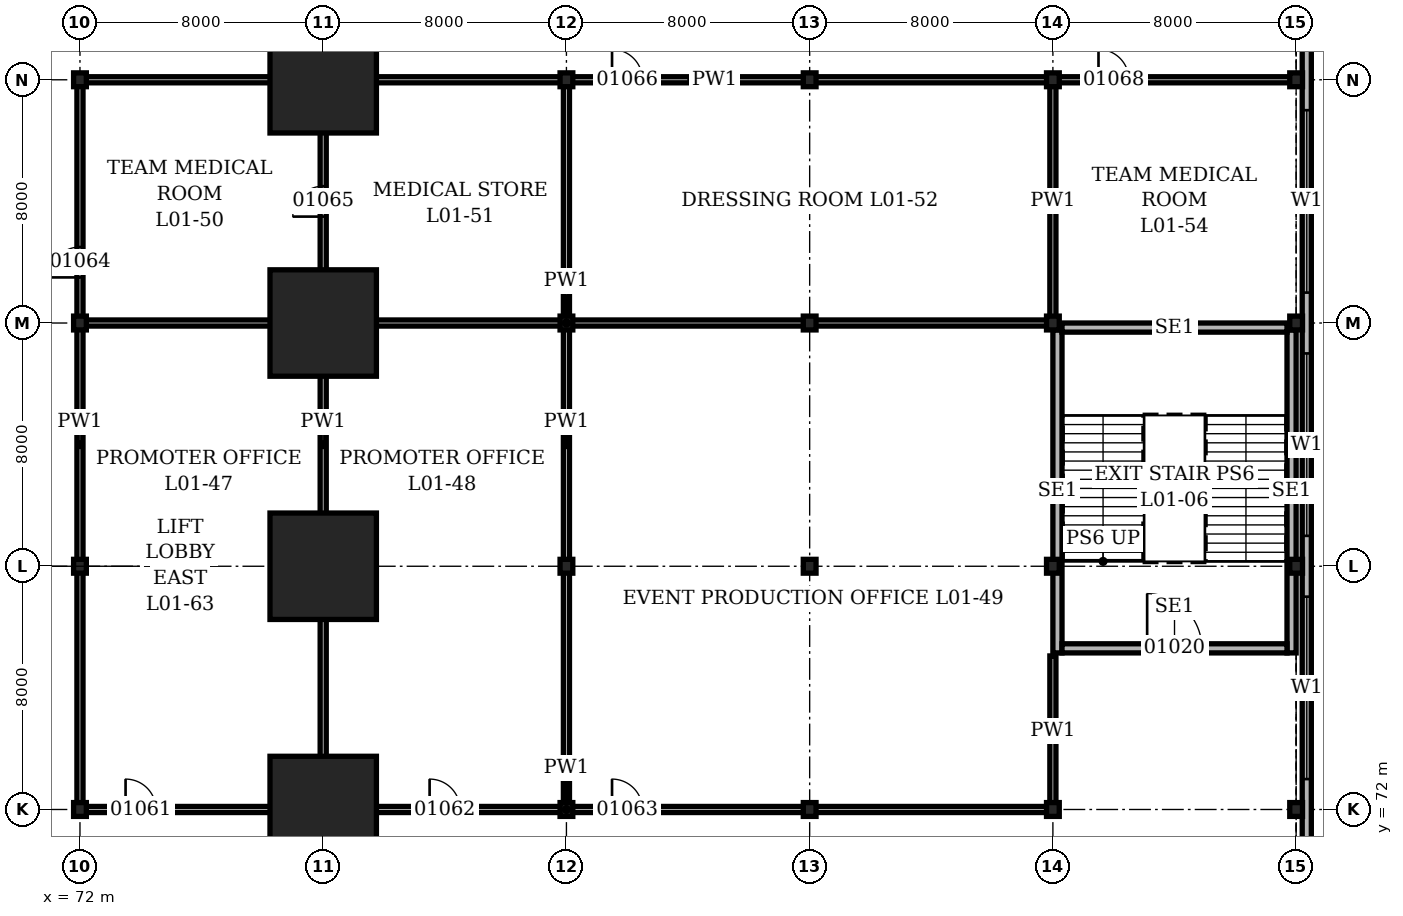
"""IFC4 building model, lengths in metres.
Left out: names, types, materials, properties, quantities, classifications, styles, units other than length and angle.
Written with IfcOpenShell. Run it as: python <this file> out.ifc"""

import sys

from ifc_helpers import new_model, si_unit, direction, frame, frame_2d, origin, origin_2d, place, context, subcontext, project, spatial, rectangle, hollow_rectangle, i_section, extrude, element, fill, save


model = new_model("IFC4")
c1 = context("Model", 3, precision=1e-05, world=origin(), true_north=direction((0.0, 1.0)))
c2 = subcontext(c1, "Body", "Model", "MODEL_VIEW")
j1 = project(units=[si_unit("LENGTHUNIT", "METRE"), si_unit("PLANEANGLEUNIT", "RADIAN")], contexts=[c1])
p1 = place(None, origin())
s1 = spatial("IfcSite", under=j1, at=p1, CompositionType="ELEMENT")
p2 = place(p1, origin())
s2 = spatial("IfcBuilding", under=s1, at=p2, CompositionType="ELEMENT")
p3 = place(p2, frame((0.0, 0.0, 4.9)))
s3 = spatial("IfcBuildingStorey", under=s2, at=p3, CompositionType="ELEMENT", Elevation=4.9)
for number, where, z_axis, x_axis in (
    (1, (72.0, 72.0, 0.0), (0.0, 0.0, 1.0), (1.0, 0.0, 0.0)),
    (2, (72.0, 80.0, 0.0), (0.0, 0.0, 1.0), (1.0, 0.0, 0.0)),
    (3, (72.0, 88.0, 0.0), (0.0, 0.0, 1.0), (1.0, 0.0, 0.0)),
    (4, (72.0, 96.0, 0.0), (0.0, 0.0, 1.0), (1.0, 0.0, 0.0)),
):
    element("IfcColumn", number, at=place(p3, frame(where, z_axis=z_axis, x_axis=x_axis)), inside=s3, PredefinedType="COLUMN", context=c2, shape_type="SweptSolid", body=[
        extrude(i_section(OverallWidth=0.419, OverallDepth=0.455, WebThickness=0.042, FlangeThickness=0.068, at=origin_2d()), origin(), (0.0, 0.0, 1.0), 5.0),
    ])
for number, where, z_axis, x_axis in (
    (5, (80.0, 72.0, 0.0), (0.0, 0.0, 1.0), (1.0, 0.0, 0.0)),
    (6, (80.0, 80.0, 0.0), (0.0, 0.0, 1.0), (1.0, 0.0, 0.0)),
    (7, (80.0, 88.0, 0.0), (0.0, 0.0, 1.0), (1.0, 0.0, 0.0)),
    (8, (80.0, 96.0, 0.0), (0.0, 0.0, 1.0), (1.0, 0.0, 0.0)),
):
    element("IfcColumn", number, at=place(p3, frame(where, z_axis=z_axis, x_axis=x_axis)), inside=s3, PredefinedType="COLUMN", context=c2, shape_type="SweptSolid", body=[
        extrude(hollow_rectangle(XDim=3.5, YDim=3.5, WallThickness=0.5, at=origin_2d()), origin(), (0.0, 0.0, 1.0), 5.0),
    ])
for number, where, z_axis, x_axis in (
    (9, (88.0, 72.0, 0.0), (0.0, 0.0, 1.0), (1.0, 0.0, 0.0)),
    (10, (88.0, 80.0, 0.0), (0.0, 0.0, 1.0), (1.0, 0.0, 0.0)),
    (11, (88.0, 88.0, 0.0), (0.0, 0.0, 1.0), (1.0, 0.0, 0.0)),
    (12, (88.0, 96.0, 0.0), (0.0, 0.0, 1.0), (1.0, 0.0, 0.0)),
    (13, (96.0, 72.0, 0.0), (0.0, 0.0, 1.0), (1.0, 0.0, 0.0)),
    (14, (96.0, 80.0, 0.0), (0.0, 0.0, 1.0), (1.0, 0.0, 0.0)),
    (15, (96.0, 88.0, 0.0), (0.0, 0.0, 1.0), (1.0, 0.0, 0.0)),
    (16, (96.0, 96.0, 0.0), (0.0, 0.0, 1.0), (1.0, 0.0, 0.0)),
    (17, (104.0, 72.0, 0.0), (0.0, 0.0, 1.0), (1.0, 0.0, 0.0)),
    (18, (104.0, 80.0, 0.0), (0.0, 0.0, 1.0), (1.0, 0.0, 0.0)),
    (19, (104.0, 88.0, 0.0), (0.0, 0.0, 1.0), (1.0, 0.0, 0.0)),
    (20, (104.0, 96.0, 0.0), (0.0, 0.0, 1.0), (1.0, 0.0, 0.0)),
    (21, (112.0, 72.0, 0.0), (0.0, 0.0, 1.0), (1.0, 0.0, 0.0)),
    (22, (112.0, 80.0, 0.0), (0.0, 0.0, 1.0), (1.0, 0.0, 0.0)),
    (23, (112.0, 88.0, 0.0), (0.0, 0.0, 1.0), (1.0, 0.0, 0.0)),
    (24, (112.0, 96.0, 0.0), (0.0, 0.0, 1.0), (1.0, 0.0, 0.0)),
):
    element("IfcColumn", number, at=place(p3, frame(where, z_axis=z_axis, x_axis=x_axis)), inside=s3, PredefinedType="COLUMN", context=c2, shape_type="SweptSolid", body=[
        extrude(i_section(OverallWidth=0.419, OverallDepth=0.455, WebThickness=0.042, FlangeThickness=0.068, at=origin_2d()), origin(), (0.0, 0.0, 1.0), 5.0),
    ])
p4 = place(p3, frame((112.35, -0.35, 0.0), z_axis=(0.0, 0.0, 1.0), x_axis=(0.0, 1.0, 0.0)))
e25 = element("IfcWall", 25, at=p4, inside=s3, PredefinedType="SOLIDWALL", context=c2, shape_type="SweptSolid", body=[
    extrude(rectangle(XDim=112.7, YDim=0.3, at=frame_2d((56.35, 0.0))), origin(), (0.0, 0.0, 1.0), 5.0),
])
p5 = place(p4, frame((1.35, 0.0, 1.0)))
e26 = element("IfcOpeningElement", 26, at=p5, cuts=e25, PredefinedType="OPENING", context=c2, shape_type="SweptSolid", body=[
    extrude(rectangle(XDim=6.0, YDim=1.5, at=frame_2d((3.0, 0.75))), frame((0.0, 0.16, 0.0), z_axis=(0.0, -1.0, 0.0), x_axis=(1.0, 0.0, 0.0)), (0.0, 0.0, 1.0), 0.32),
])
p6 = place(p4, frame((9.35, 0.0, 1.0)))
e27 = element("IfcOpeningElement", 27, at=p6, cuts=e25, PredefinedType="OPENING", context=c2, shape_type="SweptSolid", body=[
    extrude(rectangle(XDim=6.0, YDim=1.5, at=frame_2d((3.0, 0.75))), frame((0.0, 0.16, 0.0), z_axis=(0.0, -1.0, 0.0), x_axis=(1.0, 0.0, 0.0)), (0.0, 0.0, 1.0), 0.32),
])
p7 = place(p4, frame((17.35, 0.0, 1.0)))
e28 = element("IfcOpeningElement", 28, at=p7, cuts=e25, PredefinedType="OPENING", context=c2, shape_type="SweptSolid", body=[
    extrude(rectangle(XDim=6.0, YDim=1.5, at=frame_2d((3.0, 0.75))), frame((0.0, 0.16, 0.0), z_axis=(0.0, -1.0, 0.0), x_axis=(1.0, 0.0, 0.0)), (0.0, 0.0, 1.0), 0.32),
])
p8 = place(p4, frame((25.35, 0.0, 1.0)))
e29 = element("IfcOpeningElement", 29, at=p8, cuts=e25, PredefinedType="OPENING", context=c2, shape_type="SweptSolid", body=[
    extrude(rectangle(XDim=6.0, YDim=1.5, at=frame_2d((3.0, 0.75))), frame((0.0, 0.16, 0.0), z_axis=(0.0, -1.0, 0.0), x_axis=(1.0, 0.0, 0.0)), (0.0, 0.0, 1.0), 0.32),
])
p9 = place(p4, frame((33.35, 0.0, 1.0)))
e30 = element("IfcOpeningElement", 30, at=p9, cuts=e25, PredefinedType="OPENING", context=c2, shape_type="SweptSolid", body=[
    extrude(rectangle(XDim=6.0, YDim=1.5, at=frame_2d((3.0, 0.75))), frame((0.0, 0.16, 0.0), z_axis=(0.0, -1.0, 0.0), x_axis=(1.0, 0.0, 0.0)), (0.0, 0.0, 1.0), 0.32),
])
p10 = place(p4, frame((41.35, 0.0, 1.0)))
e31 = element("IfcOpeningElement", 31, at=p10, cuts=e25, PredefinedType="OPENING", context=c2, shape_type="SweptSolid", body=[
    extrude(rectangle(XDim=6.0, YDim=1.5, at=frame_2d((3.0, 0.75))), frame((0.0, 0.16, 0.0), z_axis=(0.0, -1.0, 0.0), x_axis=(1.0, 0.0, 0.0)), (0.0, 0.0, 1.0), 0.32),
])
p11 = place(p4, frame((49.35, 0.0, 1.0)))
e32 = element("IfcOpeningElement", 32, at=p11, cuts=e25, PredefinedType="OPENING", context=c2, shape_type="SweptSolid", body=[
    extrude(rectangle(XDim=6.0, YDim=1.5, at=frame_2d((3.0, 0.75))), frame((0.0, 0.16, 0.0), z_axis=(0.0, -1.0, 0.0), x_axis=(1.0, 0.0, 0.0)), (0.0, 0.0, 1.0), 0.32),
])
p12 = place(p4, frame((57.35, 0.0, 1.0)))
e33 = element("IfcOpeningElement", 33, at=p12, cuts=e25, PredefinedType="OPENING", context=c2, shape_type="SweptSolid", body=[
    extrude(rectangle(XDim=6.0, YDim=1.5, at=frame_2d((3.0, 0.75))), frame((0.0, 0.16, 0.0), z_axis=(0.0, -1.0, 0.0), x_axis=(1.0, 0.0, 0.0)), (0.0, 0.0, 1.0), 0.32),
])
p13 = place(p4, frame((65.35, 0.0, 1.0)))
e34 = element("IfcOpeningElement", 34, at=p13, cuts=e25, PredefinedType="OPENING", context=c2, shape_type="SweptSolid", body=[
    extrude(rectangle(XDim=6.0, YDim=1.5, at=frame_2d((3.0, 0.75))), frame((0.0, 0.16, 0.0), z_axis=(0.0, -1.0, 0.0), x_axis=(1.0, 0.0, 0.0)), (0.0, 0.0, 1.0), 0.32),
])
p14 = place(p4, frame((73.35, 0.0, 1.0)))
e35 = element("IfcOpeningElement", 35, at=p14, cuts=e25, PredefinedType="OPENING", context=c2, shape_type="SweptSolid", body=[
    extrude(rectangle(XDim=6.0, YDim=1.5, at=frame_2d((3.0, 0.75))), frame((0.0, 0.16, 0.0), z_axis=(0.0, -1.0, 0.0), x_axis=(1.0, 0.0, 0.0)), (0.0, 0.0, 1.0), 0.32),
])
p15 = place(p4, frame((81.35, 0.0, 1.0)))
e36 = element("IfcOpeningElement", 36, at=p15, cuts=e25, PredefinedType="OPENING", context=c2, shape_type="SweptSolid", body=[
    extrude(rectangle(XDim=6.0, YDim=1.5, at=frame_2d((3.0, 0.75))), frame((0.0, 0.16, 0.0), z_axis=(0.0, -1.0, 0.0), x_axis=(1.0, 0.0, 0.0)), (0.0, 0.0, 1.0), 0.32),
])
p16 = place(p4, frame((89.35, 0.0, 1.0)))
e37 = element("IfcOpeningElement", 37, at=p16, cuts=e25, PredefinedType="OPENING", context=c2, shape_type="SweptSolid", body=[
    extrude(rectangle(XDim=6.0, YDim=1.5, at=frame_2d((3.0, 0.75))), frame((0.0, 0.16, 0.0), z_axis=(0.0, -1.0, 0.0), x_axis=(1.0, 0.0, 0.0)), (0.0, 0.0, 1.0), 0.32),
])
p17 = place(p4, frame((97.35, 0.0, 1.0)))
e38 = element("IfcOpeningElement", 38, at=p17, cuts=e25, PredefinedType="OPENING", context=c2, shape_type="SweptSolid", body=[
    extrude(rectangle(XDim=6.0, YDim=1.5, at=frame_2d((3.0, 0.75))), frame((0.0, 0.16, 0.0), z_axis=(0.0, -1.0, 0.0), x_axis=(1.0, 0.0, 0.0)), (0.0, 0.0, 1.0), 0.32),
])
p18 = place(p4, frame((105.35, 0.0, 1.0)))
e39 = element("IfcOpeningElement", 39, at=p18, cuts=e25, PredefinedType="OPENING", context=c2, shape_type="SweptSolid", body=[
    extrude(rectangle(XDim=6.0, YDim=1.5, at=frame_2d((3.0, 0.75))), frame((0.0, 0.16, 0.0), z_axis=(0.0, -1.0, 0.0), x_axis=(1.0, 0.0, 0.0)), (0.0, 0.0, 1.0), 0.32),
])
for number, where, z_axis, x_axis in (
    (40, (104.15, 77.15, 0.0), (0.0, 0.0, 1.0), (0.0, 1.0, 0.0)),
    (41, (111.85, 77.15, 0.0), (0.0, 0.0, 1.0), (0.0, 1.0, 0.0)),
):
    element("IfcWall", number, at=place(p3, frame(where, z_axis=z_axis, x_axis=x_axis)), inside=s3, PredefinedType="SOLIDWALL", context=c2, shape_type="SweptSolid", body=[
        extrude(rectangle(XDim=10.623, YDim=0.3, at=frame_2d((5.312, 0.0))), origin(), (0.0, 0.0, 1.0), 4.8),
    ])
p19 = place(p3, frame((104.3, 77.3, 0.0), z_axis=(0.0, 0.0, 1.0), x_axis=(1.0, 0.0, 0.0)))
e42 = element("IfcWall", 42, at=p19, inside=s3, PredefinedType="SOLIDWALL", context=c2, shape_type="SweptSolid", body=[
    extrude(rectangle(XDim=7.4, YDim=0.3, at=frame_2d((3.7, 0.0))), origin(), (0.0, 0.0, 1.0), 4.8),
])
p20 = place(p19, frame((2.8, 0.0, 0.0)))
e43 = element("IfcOpeningElement", 43, at=p20, cuts=e42, PredefinedType="OPENING", context=c2, shape_type="SweptSolid", body=[
    extrude(rectangle(XDim=1.8, YDim=2.1, at=frame_2d((0.9, 1.05))), frame((0.0, 0.16, 0.0), z_axis=(0.0, -1.0, 0.0), x_axis=(1.0, 0.0, 0.0)), (0.0, 0.0, 1.0), 0.32),
])
p21 = place(p3, frame((104.3, 87.85, 0.0), z_axis=(0.0, 0.0, 1.0), x_axis=(1.0, 0.0, 0.0)))
e44 = element("IfcWall", 44, at=p21, inside=s3, PredefinedType="SOLIDWALL", context=c2, shape_type="SweptSolid", body=[
    extrude(rectangle(XDim=7.4, YDim=0.3, at=frame_2d((3.7, 0.0))), origin(), (0.0, 0.0, 1.0), 4.8),
])
p22 = place(p3, frame((72.1, 72.0, 0.0), z_axis=(0.0, 0.0, 1.0), x_axis=(1.0, 0.0, 0.0)))
e45 = element("IfcWall", 45, at=p22, inside=s3, PredefinedType="PARTITIONING", context=c2, shape_type="SweptSolid", body=[
    extrude(rectangle(XDim=31.8, YDim=0.2, at=frame_2d((15.9, 0.0))), origin(), (0.0, 0.0, 1.0), 4.028),
])
p23 = place(p22, frame((1.4, 0.0, 0.0)))
e46 = element("IfcOpeningElement", 46, at=p23, cuts=e45, PredefinedType="OPENING", context=c2, shape_type="SweptSolid", body=[
    extrude(rectangle(XDim=1.0, YDim=2.1, at=frame_2d((0.5, 1.05))), frame((0.0, 0.11, 0.0), z_axis=(0.0, -1.0, 0.0), x_axis=(1.0, 0.0, 0.0)), (0.0, 0.0, 1.0), 0.22),
])
p24 = place(p22, frame((11.4, 0.0, 0.0)))
e47 = element("IfcOpeningElement", 47, at=p24, cuts=e45, PredefinedType="OPENING", context=c2, shape_type="SweptSolid", body=[
    extrude(rectangle(XDim=1.0, YDim=2.1, at=frame_2d((0.5, 1.05))), frame((0.0, 0.11, 0.0), z_axis=(0.0, -1.0, 0.0), x_axis=(1.0, 0.0, 0.0)), (0.0, 0.0, 1.0), 0.22),
])
p25 = place(p22, frame((17.4, 0.0, 0.0)))
e48 = element("IfcOpeningElement", 48, at=p25, cuts=e45, PredefinedType="OPENING", context=c2, shape_type="SweptSolid", body=[
    extrude(rectangle(XDim=1.0, YDim=2.1, at=frame_2d((0.5, 1.05))), frame((0.0, 0.11, 0.0), z_axis=(0.0, -1.0, 0.0), x_axis=(1.0, 0.0, 0.0)), (0.0, 0.0, 1.0), 0.22),
])
p26 = place(p3, frame((72.1, 88.0, 0.0), z_axis=(0.0, 0.0, 1.0), x_axis=(1.0, 0.0, 0.0)))
e49 = element("IfcWall", 49, at=p26, inside=s3, PredefinedType="PARTITIONING", context=c2, shape_type="SweptSolid", body=[
    extrude(rectangle(XDim=31.8, YDim=0.2, at=frame_2d((15.9, 0.0))), origin(), (0.0, 0.0, 1.0), 4.028),
])
p27 = place(p3, frame((72.1, 96.0, 0.0), z_axis=(0.0, 0.0, 1.0), x_axis=(1.0, 0.0, 0.0)))
e50 = element("IfcWall", 50, at=p27, inside=s3, PredefinedType="PARTITIONING", context=c2, shape_type="SweptSolid", body=[
    extrude(rectangle(XDim=40.05, YDim=0.2, at=frame_2d((20.025, 0.0))), origin(), (0.0, 0.0, 1.0), 4.028),
])
p28 = place(p27, frame((17.4, 0.0, 0.0)))
e51 = element("IfcOpeningElement", 51, at=p28, cuts=e50, PredefinedType="OPENING", context=c2, shape_type="SweptSolid", body=[
    extrude(rectangle(XDim=1.0, YDim=2.1, at=frame_2d((0.5, 1.05))), frame((0.0, 0.11, 0.0), z_axis=(0.0, -1.0, 0.0), x_axis=(1.0, 0.0, 0.0)), (0.0, 0.0, 1.0), 0.22),
])
p29 = place(p27, frame((33.4, 0.0, 0.0)))
e52 = element("IfcOpeningElement", 52, at=p29, cuts=e50, PredefinedType="OPENING", context=c2, shape_type="SweptSolid", body=[
    extrude(rectangle(XDim=1.0, YDim=2.1, at=frame_2d((0.5, 1.05))), frame((0.0, 0.11, 0.0), z_axis=(0.0, -1.0, 0.0), x_axis=(1.0, 0.0, 0.0)), (0.0, 0.0, 1.0), 0.22),
])
p30 = place(p3, frame((72.0, 72.1, 0.0), z_axis=(0.0, 0.0, 1.0), x_axis=(0.0, 1.0, 0.0)))
e53 = element("IfcWall", 53, at=p30, inside=s3, PredefinedType="PARTITIONING", context=c2, shape_type="SweptSolid", body=[
    extrude(rectangle(XDim=23.8, YDim=0.2, at=frame_2d((11.9, 0.0))), origin(), (0.0, 0.0, 1.0), 4.028),
])
p31 = place(p30, frame((17.4, 0.0, 0.0)))
e54 = element("IfcOpeningElement", 54, at=p31, cuts=e53, PredefinedType="OPENING", context=c2, shape_type="SweptSolid", body=[
    extrude(rectangle(XDim=1.0, YDim=2.1, at=frame_2d((0.5, 1.05))), frame((0.0, 0.11, 0.0), z_axis=(0.0, -1.0, 0.0), x_axis=(1.0, 0.0, 0.0)), (0.0, 0.0, 1.0), 0.22),
])
p32 = place(p3, frame((80.0, 72.1, 0.0), z_axis=(0.0, 0.0, 1.0), x_axis=(0.0, 1.0, 0.0)))
e55 = element("IfcWall", 55, at=p32, inside=s3, PredefinedType="PARTITIONING", context=c2, shape_type="SweptSolid", body=[
    extrude(rectangle(XDim=23.8, YDim=0.2, at=frame_2d((11.9, 0.0))), origin(), (0.0, 0.0, 1.0), 4.028),
])
p33 = place(p32, frame((19.4, 0.0, 0.0)))
e56 = element("IfcOpeningElement", 56, at=p33, cuts=e55, PredefinedType="OPENING", context=c2, shape_type="SweptSolid", body=[
    extrude(rectangle(XDim=1.0, YDim=2.1, at=frame_2d((0.5, 1.05))), frame((0.0, 0.11, 0.0), z_axis=(0.0, -1.0, 0.0), x_axis=(1.0, 0.0, 0.0)), (0.0, 0.0, 1.0), 0.22),
])
p34 = place(p3, frame((88.0, 72.1, 0.0), z_axis=(0.0, 0.0, 1.0), x_axis=(0.0, 1.0, 0.0)))
e57 = element("IfcWall", 57, at=p34, inside=s3, PredefinedType="PARTITIONING", context=c2, shape_type="SweptSolid", body=[
    extrude(rectangle(XDim=23.8, YDim=0.2, at=frame_2d((11.9, 0.0))), origin(), (0.0, 0.0, 1.0), 4.028),
])
p35 = place(p3, frame((104.0, 72.1, 0.0), z_axis=(0.0, 0.0, 1.0), x_axis=(0.0, 1.0, 0.0)))
e58 = element("IfcWall", 58, at=p35, inside=s3, PredefinedType="PARTITIONING", context=c2, shape_type="SweptSolid", body=[
    extrude(rectangle(XDim=4.95, YDim=0.2, at=frame_2d((2.475, 0.0))), origin(), (0.0, 0.0, 1.0), 4.028),
])
p36 = place(p3, frame((104.0, 88.1, 0.0), z_axis=(0.0, 0.0, 1.0), x_axis=(0.0, 1.0, 0.0)))
e59 = element("IfcWall", 59, at=p36, inside=s3, PredefinedType="PARTITIONING", context=c2, shape_type="SweptSolid", body=[
    extrude(rectangle(XDim=7.8, YDim=0.2, at=frame_2d((3.9, 0.0))), origin(), (0.0, 0.0, 1.0), 4.028),
])
p37 = place(p14, origin())
e60 = element("IfcWindow", 60, at=p37, inside=s3, PartitioningType="SINGLE_PANEL", PredefinedType="WINDOW", context=c2, shape_type="SweptSolid", body=[
    extrude(rectangle(XDim=6.0, YDim=1.5, at=frame_2d((3.0, 0.75))), frame((0.0, 0.03, 0.0), z_axis=(0.0, -1.0, 0.0), x_axis=(1.0, 0.0, 0.0)), (0.0, 0.0, 1.0), 0.06),
])
fill(e35, e60)
p38 = place(p15, origin())
e61 = element("IfcWindow", 61, at=p38, inside=s3, PartitioningType="SINGLE_PANEL", PredefinedType="WINDOW", context=c2, shape_type="SweptSolid", body=[
    extrude(rectangle(XDim=6.0, YDim=1.5, at=frame_2d((3.0, 0.75))), frame((0.0, 0.03, 0.0), z_axis=(0.0, -1.0, 0.0), x_axis=(1.0, 0.0, 0.0)), (0.0, 0.0, 1.0), 0.06),
])
fill(e36, e61)
p39 = place(p16, origin())
e62 = element("IfcWindow", 62, at=p39, inside=s3, PartitioningType="SINGLE_PANEL", PredefinedType="WINDOW", context=c2, shape_type="SweptSolid", body=[
    extrude(rectangle(XDim=6.0, YDim=1.5, at=frame_2d((3.0, 0.75))), frame((0.0, 0.03, 0.0), z_axis=(0.0, -1.0, 0.0), x_axis=(1.0, 0.0, 0.0)), (0.0, 0.0, 1.0), 0.06),
])
fill(e37, e62)
p40 = place(p20, origin())
e63 = element("IfcDoor", 63, at=p40, inside=s3, OperationType="DOUBLE_DOOR_SINGLE_SWING", PredefinedType="DOOR", context=c2, shape_type="SweptSolid", body=[
    extrude(rectangle(XDim=1.8, YDim=2.1, at=frame_2d((0.9, 1.05))), frame((0.0, 0.15, 0.0), z_axis=(0.0, -1.0, 0.0), x_axis=(1.0, 0.0, 0.0)), (0.0, 0.0, 1.0), 0.3),
])
fill(e43, e63)
p41 = place(p23, origin())
e64 = element("IfcDoor", 64, at=p41, inside=s3, OperationType="SINGLE_SWING_LEFT", PredefinedType="DOOR", context=c2, shape_type="SweptSolid", body=[
    extrude(rectangle(XDim=1.0, YDim=2.1, at=frame_2d((0.5, 1.05))), frame((0.0, 0.1, 0.0), z_axis=(0.0, -1.0, 0.0), x_axis=(1.0, 0.0, 0.0)), (0.0, 0.0, 1.0), 0.199),
])
fill(e46, e64)
p42 = place(p24, origin())
e65 = element("IfcDoor", 65, at=p42, inside=s3, OperationType="SINGLE_SWING_LEFT", PredefinedType="DOOR", context=c2, shape_type="SweptSolid", body=[
    extrude(rectangle(XDim=1.0, YDim=2.1, at=frame_2d((0.5, 1.05))), frame((0.0, 0.1, 0.0), z_axis=(0.0, -1.0, 0.0), x_axis=(1.0, 0.0, 0.0)), (0.0, 0.0, 1.0), 0.199),
])
fill(e47, e65)
p43 = place(p25, origin())
e66 = element("IfcDoor", 66, at=p43, inside=s3, OperationType="SINGLE_SWING_LEFT", PredefinedType="DOOR", context=c2, shape_type="SweptSolid", body=[
    extrude(rectangle(XDim=1.0, YDim=2.1, at=frame_2d((0.5, 1.05))), frame((0.0, 0.1, 0.0), z_axis=(0.0, -1.0, 0.0), x_axis=(1.0, 0.0, 0.0)), (0.0, 0.0, 1.0), 0.199),
])
fill(e48, e66)
p44 = place(p31, origin())
e67 = element("IfcDoor", 67, at=p44, inside=s3, OperationType="SINGLE_SWING_LEFT", PredefinedType="DOOR", context=c2, shape_type="SweptSolid", body=[
    extrude(rectangle(XDim=1.0, YDim=2.1, at=frame_2d((0.5, 1.05))), frame((0.0, 0.1, 0.0), z_axis=(0.0, -1.0, 0.0), x_axis=(1.0, 0.0, 0.0)), (0.0, 0.0, 1.0), 0.199),
])
fill(e54, e67)
p45 = place(p33, origin())
e68 = element("IfcDoor", 68, at=p45, inside=s3, OperationType="SINGLE_SWING_LEFT", PredefinedType="DOOR", context=c2, shape_type="SweptSolid", body=[
    extrude(rectangle(XDim=1.0, YDim=2.1, at=frame_2d((0.5, 1.05))), frame((0.0, 0.1, 0.0), z_axis=(0.0, -1.0, 0.0), x_axis=(1.0, 0.0, 0.0)), (0.0, 0.0, 1.0), 0.199),
])
fill(e56, e68)
p46 = place(p28, origin())
e69 = element("IfcDoor", 69, at=p46, inside=s3, OperationType="SINGLE_SWING_LEFT", PredefinedType="DOOR", context=c2, shape_type="SweptSolid", body=[
    extrude(rectangle(XDim=1.0, YDim=2.1, at=frame_2d((0.5, 1.05))), frame((0.0, 0.1, 0.0), z_axis=(0.0, -1.0, 0.0), x_axis=(1.0, 0.0, 0.0)), (0.0, 0.0, 1.0), 0.199),
])
fill(e51, e69)
p47 = place(p29, origin())
e70 = element("IfcDoor", 70, at=p47, inside=s3, OperationType="SINGLE_SWING_LEFT", PredefinedType="DOOR", context=c2, shape_type="SweptSolid", body=[
    extrude(rectangle(XDim=1.0, YDim=2.1, at=frame_2d((0.5, 1.05))), frame((0.0, 0.1, 0.0), z_axis=(0.0, -1.0, 0.0), x_axis=(1.0, 0.0, 0.0)), (0.0, 0.0, 1.0), 0.199),
])
fill(e52, e70)
save(model, sys.argv[1])
